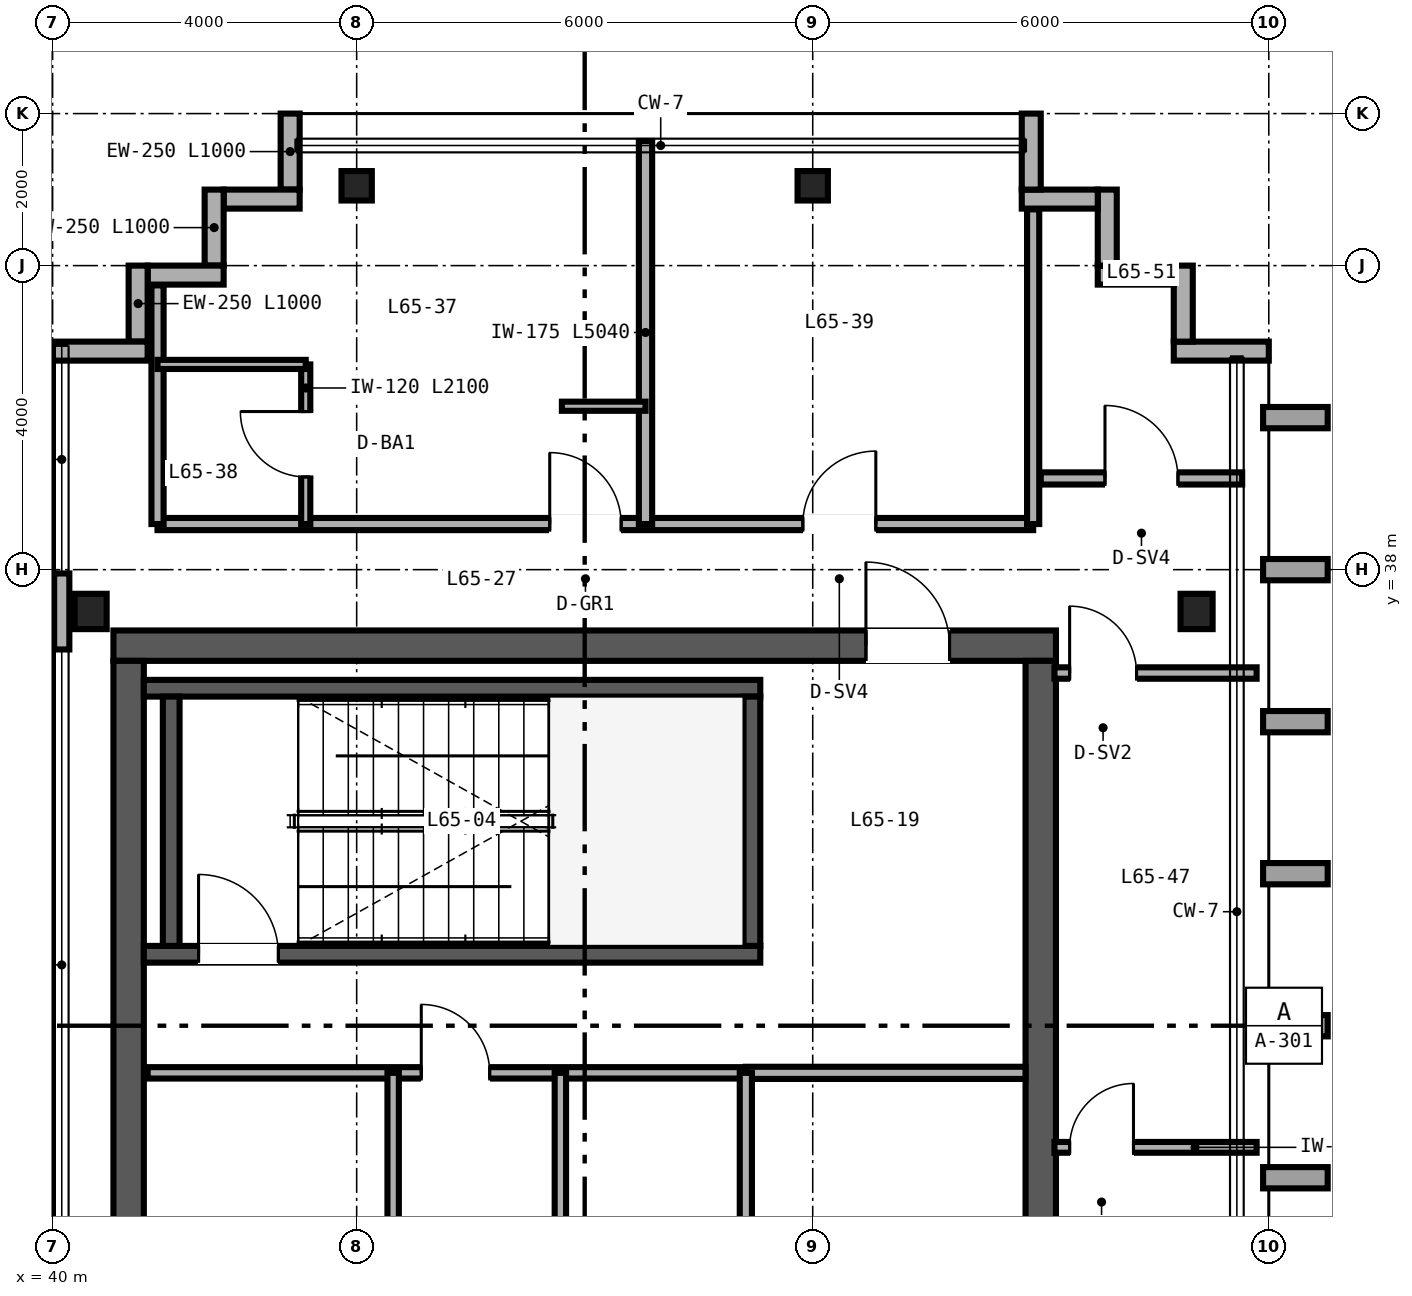
"""IFC4 building model, lengths in metres.
Left out: names, types, materials, properties, quantities, classifications, styles, units other than length and angle.
Written with IfcOpenShell. Run it as: python <this file> out.ifc"""

import sys

from ifc_helpers import new_model, si_unit, direction, frame, frame_2d, origin, origin_2d, place, context, subcontext, project, spatial, rectangle, i_section, extrude, source, transform, mapped, element, fill, save


model = new_model("IFC4")
c1 = context("Model", 3, precision=1e-05, world=origin(), true_north=direction((0.0, 1.0)))
c2 = subcontext(c1, "Body", "Model", "MODEL_VIEW")
j1 = project(units=[si_unit("LENGTHUNIT", "METRE"), si_unit("PLANEANGLEUNIT", "RADIAN")], contexts=[c1])
p1 = place(None, origin())
s1 = spatial("IfcSite", under=j1, at=p1, CompositionType="ELEMENT")
p2 = place(p1, origin())
s2 = spatial("IfcBuilding", under=s1, at=p2, CompositionType="ELEMENT")
p3 = place(p2, frame((0.0, 0.0, 258.0)))
s3 = spatial("IfcBuildingStorey", under=s2, at=p3, CompositionType="ELEMENT", Elevation=258.0)
p4 = place(p3, frame((40.8, 37.0, 0.0), z_axis=(0.0, 0.0, 1.0), x_axis=(1.0, 0.0, 0.0)))
e1 = element("IfcWall", 1, at=p4, inside=s3, PredefinedType="SHEAR", context=c2, shape_type="SweptSolid", body=[
    extrude(rectangle(XDim=12.4, YDim=0.4, at=frame_2d((6.2, 0.0))), origin(), (0.0, 0.0, 1.0), 3.38),
])
p5 = place(p4, frame((9.9, 0.0, 0.0)))
e2 = element("IfcOpeningElement", 2, at=p5, cuts=e1, PredefinedType="OPENING", context=c2, shape_type="SweptSolid", body=[
    extrude(rectangle(XDim=1.1, YDim=2.15, at=frame_2d((0.55, 1.075))), frame((0.0, 0.21, 0.0), z_axis=(0.0, -1.0, 0.0), x_axis=(1.0, 0.0, 0.0)), (0.0, 0.0, 1.0), 0.42),
])
for number, where, z_axis, x_axis in (
    (3, (41.0, 15.2, 0.0), (0.0, 0.0, 1.0), (0.0, 1.0, 0.0)),
    (4, (53.0, 15.2, 0.0), (0.0, 0.0, 1.0), (0.0, 1.0, 0.0)),
):
    element("IfcWall", number, at=place(p3, frame(where, z_axis=z_axis, x_axis=x_axis)), inside=s3, PredefinedType="SHEAR", context=c2, shape_type="SweptSolid", body=[
        extrude(rectangle(XDim=21.6, YDim=0.4, at=frame_2d((10.8, 0.0))), origin(), (0.0, 0.0, 1.0), 3.38),
    ])
p6 = place(p3, frame((41.2, 32.94, 0.0), z_axis=(0.0, 0.0, 1.0), x_axis=(1.0, 0.0, 0.0)))
e5 = element("IfcWall", 5, at=p6, inside=s3, PredefinedType="SHEAR", context=c2, shape_type="SweptSolid", body=[
    extrude(rectangle(XDim=8.11, YDim=0.22, at=frame_2d((4.055, 0.0))), origin(), (0.0, 0.0, 1.0), 3.4),
])
p7 = place(p6, frame((0.72, 0.0, 0.0)))
e6 = element("IfcOpeningElement", 6, at=p7, cuts=e5, PredefinedType="OPENING", context=c2, shape_type="SweptSolid", body=[
    extrude(rectangle(XDim=1.05, YDim=2.15, at=frame_2d((0.525, 1.075))), frame((0.0, 0.12, 0.0), z_axis=(0.0, -1.0, 0.0), x_axis=(1.0, 0.0, 0.0)), (0.0, 0.0, 1.0), 0.24),
])
p8 = place(p3, frame((41.2, 36.44, 0.0), z_axis=(0.0, 0.0, 1.0), x_axis=(1.0, 0.0, 0.0)))
e7 = element("IfcWall", 7, at=p8, inside=s3, PredefinedType="SHEAR", context=c2, shape_type="SweptSolid", body=[
    extrude(rectangle(XDim=8.11, YDim=0.22, at=frame_2d((4.055, 0.0))), origin(), (0.0, 0.0, 1.0), 3.4),
])
for number, where, z_axis, x_axis in (
    (8, (41.56, 33.05, 0.0), (0.0, 0.0, 1.0), (0.0, 1.0, 0.0)),
    (9, (49.2, 33.05, 0.0), (0.0, 0.0, 1.0), (0.0, 1.0, 0.0)),
):
    element("IfcWall", number, at=place(p3, frame(where, z_axis=z_axis, x_axis=x_axis)), inside=s3, PredefinedType="SHEAR", context=c2, shape_type="SweptSolid", body=[
        extrude(rectangle(XDim=3.28, YDim=0.22, at=frame_2d((1.64, 0.0))), origin(), (0.0, 0.0, 1.0), 3.4),
    ])
m1 = source(origin(), c2, "Body", "SweptSolid", [
    extrude(i_section(OverallWidth=0.422, OverallDepth=0.465, WebThickness=0.045, FlangeThickness=0.073, FilletRadius=0.025, at=origin_2d()), origin(), (0.0, 0.0, 1.0), 3.38),
])
for number, where, z_axis, x_axis in (
    (10, (40.5, 37.45, 0.0), (0.0, 0.0, 1.0), (1.0, 0.0, 0.0)),
    (11, (55.05, 37.45, 0.0), (0.0, 0.0, 1.0), (1.0, 0.0, 0.0)),
):
    element("IfcColumn", number, at=place(p3, frame(where, z_axis=z_axis, x_axis=x_axis)), inside=s3, PredefinedType="COLUMN", context=c2, shape_type="MappedRepresentation", body=[
        mapped(m1, transform((0.0, 0.0, 0.0), scale=1.0)),
    ])
m2 = source(origin(), c2, "Body", "SweptSolid", [
    extrude(i_section(OverallWidth=0.399, OverallDepth=0.387, WebThickness=0.021, FlangeThickness=0.033, FilletRadius=0.025, at=origin_2d()), origin(), (0.0, 0.0, 1.0), 3.38),
])
for number, where, z_axis, x_axis in (
    (12, (44.0, 43.05, 0.0), (0.0, 0.0, 1.0), (1.0, 0.0, 0.0)),
    (13, (50.0, 43.05, 0.0), (0.0, 0.0, 1.0), (1.0, 0.0, 0.0)),
):
    element("IfcColumn", number, at=place(p3, frame(where, z_axis=z_axis, x_axis=x_axis)), inside=s3, PredefinedType="COLUMN", context=c2, shape_type="MappedRepresentation", body=[
        mapped(m2, transform((0.0, 0.0, 0.0), scale=1.0)),
    ])
p9 = place(p3, frame((56.0, 40.875, 0.0), z_axis=(0.0, 0.0, 1.0), x_axis=(-1.0, 0.0, 0.0)))
e14 = element("IfcWall", 14, at=p9, inside=s3, PredefinedType="SOLIDWALL", context=c2, shape_type="SweptSolid", body=[
    extrude(rectangle(XDim=1.25, YDim=0.25, at=frame_2d((0.625, 0.0))), origin(), (0.0, 0.0, 1.0), 3.38),
])
for number, where, z_axis, x_axis in (
    (15, (54.875, 41.0, 0.0), (0.0, 0.0, 1.0), (0.0, 1.0, 0.0)),
    (16, (54.75, 41.875, 0.0), (0.0, 0.0, 1.0), (-1.0, 0.0, 0.0)),
    (17, (53.875, 42.0, 0.0), (0.0, 0.0, 1.0), (0.0, 1.0, 0.0)),
    (18, (53.75, 42.875, 0.0), (0.0, 0.0, 1.0), (-1.0, 0.0, 0.0)),
    (19, (52.875, 43.0, 0.0), (0.0, 0.0, 1.0), (0.0, 1.0, 0.0)),
    (20, (43.125, 44.0, 0.0), (0.0, 0.0, 1.0), (0.0, -1.0, 0.0)),
    (21, (43.25, 42.875, 0.0), (0.0, 0.0, 1.0), (-1.0, 0.0, 0.0)),
    (22, (42.125, 43.0, 0.0), (0.0, 0.0, 1.0), (0.0, -1.0, 0.0)),
    (23, (42.25, 41.875, 0.0), (0.0, 0.0, 1.0), (-1.0, 0.0, 0.0)),
    (24, (41.125, 42.0, 0.0), (0.0, 0.0, 1.0), (0.0, -1.0, 0.0)),
):
    element("IfcWall", number, at=place(p3, frame(where, z_axis=z_axis, x_axis=x_axis)), inside=s3, PredefinedType="SOLIDWALL", context=c2, shape_type="SweptSolid", body=[
        extrude(rectangle(XDim=1.0, YDim=0.25, at=frame_2d((0.5, 0.0))), origin(), (0.0, 0.0, 1.0), 3.38),
    ])
p10 = place(p3, frame((41.25, 40.875, 0.0), z_axis=(0.0, 0.0, 1.0), x_axis=(-1.0, 0.0, 0.0)))
e25 = element("IfcWall", 25, at=p10, inside=s3, PredefinedType="SOLIDWALL", context=c2, shape_type="SweptSolid", body=[
    extrude(rectangle(XDim=1.25, YDim=0.25, at=frame_2d((0.625, 0.0))), origin(), (0.0, 0.0, 1.0), 3.38),
])
p11 = place(p3, frame((40.12, 36.95, 0.0), z_axis=(0.0, 0.0, 1.0), x_axis=(0.0, 1.0, 0.0)))
e26 = element("IfcWall", 26, at=p11, inside=s3, PredefinedType="PARAPET", context=c2, shape_type="SweptSolid", body=[
    extrude(rectangle(XDim=1.0, YDim=0.2, at=frame_2d((0.5, 0.0))), origin(), (0.0, 0.0, 1.0), 3.38),
])
p12 = place(p3, frame((41.25, 31.38, 0.0), z_axis=(0.0, 0.0, 1.0), x_axis=(1.0, 0.0, 0.0)))
e27 = element("IfcWall", 27, at=p12, inside=s3, PredefinedType="PARTITIONING", context=c2, shape_type="SweptSolid", body=[
    extrude(rectangle(XDim=7.87, YDim=0.15, at=frame_2d((3.935, 0.0))), origin(), (0.0, 0.0, 1.0), 2.48),
])
p13 = place(p12, frame((3.6, 0.0, 0.0)))
e28 = element("IfcOpeningElement", 28, at=p13, cuts=e27, PredefinedType="OPENING", context=c2, shape_type="SweptSolid", body=[
    extrude(rectangle(XDim=0.9, YDim=2.15, at=frame_2d((0.45, 1.075))), frame((0.0, 0.085, 0.0), z_axis=(0.0, -1.0, 0.0), x_axis=(1.0, 0.0, 0.0)), (0.0, 0.0, 1.0), 0.17),
])
p14 = place(p3, frame((46.68, 15.25, 0.0), z_axis=(0.0, 0.0, 1.0), x_axis=(0.0, 1.0, 0.0)))
e29 = element("IfcWall", 29, at=p14, inside=s3, PredefinedType="PARTITIONING", context=c2, shape_type="SweptSolid", body=[
    extrude(rectangle(XDim=16.13, YDim=0.15, at=frame_2d((8.065, 0.0))), origin(), (0.0, 0.0, 1.0), 2.453),
])
p15 = place(p14, frame((7.5, 0.0, 0.0)))
e30 = element("IfcOpeningElement", 30, at=p15, cuts=e29, PredefinedType="OPENING", context=c2, shape_type="SweptSolid", body=[
    extrude(rectangle(XDim=0.9, YDim=2.15, at=frame_2d((0.45, 1.075))), frame((0.0, 0.085, 0.0), z_axis=(0.0, -1.0, 0.0), x_axis=(1.0, 0.0, 0.0)), (0.0, 0.0, 1.0), 0.17),
])
p16 = place(p3, frame((49.12, 31.38, 0.0), z_axis=(0.0, 0.0, 1.0), x_axis=(1.0, 0.0, 0.0)))
e31 = element("IfcWall", 31, at=p16, inside=s3, PredefinedType="PARTITIONING", context=c2, shape_type="SweptSolid", body=[
    extrude(rectangle(XDim=3.68, YDim=0.16, at=frame_2d((1.84, 0.0))), origin(), (0.0, 0.0, 1.0), 2.48),
])
p17 = place(p3, frame((49.12, 15.25, 0.0), z_axis=(0.0, 0.0, 1.0), x_axis=(0.0, 1.0, 0.0)))
e32 = element("IfcWall", 32, at=p17, inside=s3, PredefinedType="PARTITIONING", context=c2, shape_type="SweptSolid", body=[
    extrude(rectangle(XDim=16.13, YDim=0.16, at=frame_2d((8.065, 0.0))), origin(), (0.0, 0.0, 1.0), 2.453),
])
p18 = place(p17, frame((4.0, 0.0, 0.0)))
e33 = element("IfcOpeningElement", 33, at=p18, cuts=e32, PredefinedType="OPENING", context=c2, shape_type="SweptSolid", body=[
    extrude(rectangle(XDim=0.92, YDim=2.15, at=frame_2d((0.46, 1.075))), frame((0.0, 0.09, 0.0), z_axis=(0.0, -1.0, 0.0), x_axis=(1.0, 0.0, 0.0)), (0.0, 0.0, 1.0), 0.18),
])
p19 = place(p17, frame((12.0, 0.0, 0.0)))
e34 = element("IfcOpeningElement", 34, at=p19, cuts=e32, PredefinedType="OPENING", context=c2, shape_type="SweptSolid", body=[
    extrude(rectangle(XDim=0.92, YDim=2.15, at=frame_2d((0.46, 1.075))), frame((0.0, 0.09, 0.0), z_axis=(0.0, -1.0, 0.0), x_axis=(1.0, 0.0, 0.0)), (0.0, 0.0, 1.0), 0.18),
])
p20 = place(p3, frame((44.48, 15.25, 0.0), z_axis=(0.0, 0.0, 1.0), x_axis=(0.0, 1.0, 0.0)))
e35 = element("IfcWall", 35, at=p20, inside=s3, PredefinedType="PARTITIONING", context=c2, shape_type="SweptSolid", body=[
    extrude(rectangle(XDim=16.13, YDim=0.15, at=frame_2d((8.065, 0.0))), origin(), (0.0, 0.0, 1.0), 2.453),
])
p21 = place(p20, frame((4.5, 0.0, 0.0)))
e36 = element("IfcOpeningElement", 36, at=p21, cuts=e35, PredefinedType="OPENING", context=c2, shape_type="SweptSolid", body=[
    extrude(rectangle(XDim=0.92, YDim=2.15, at=frame_2d((0.46, 1.075))), frame((0.0, 0.085, 0.0), z_axis=(0.0, -1.0, 0.0), x_axis=(1.0, 0.0, 0.0)), (0.0, 0.0, 1.0), 0.17),
])
p22 = place(p3, frame((41.38, 38.6, 0.0), z_axis=(0.0, 0.0, 1.0), x_axis=(1.0, 0.0, 0.0)))
e37 = element("IfcWall", 37, at=p22, inside=s3, PredefinedType="PARTITIONING", context=c2, shape_type="SweptSolid", body=[
    extrude(rectangle(XDim=11.52, YDim=0.16, at=frame_2d((5.76, 0.0))), origin(), (0.0, 0.0, 1.0), 3.38),
])
p23 = place(p22, frame((5.16, 0.0, 0.0)))
e38 = element("IfcOpeningElement", 38, at=p23, cuts=e37, PredefinedType="OPENING", context=c2, shape_type="SweptSolid", body=[
    extrude(rectangle(XDim=0.94, YDim=2.15, at=frame_2d((0.47, 1.075))), frame((0.0, 0.09, 0.0), z_axis=(0.0, -1.0, 0.0), x_axis=(1.0, 0.0, 0.0)), (0.0, 0.0, 1.0), 0.18),
])
p24 = place(p22, frame((8.49, 0.0, 0.0)))
e39 = element("IfcOpeningElement", 39, at=p24, cuts=e37, PredefinedType="OPENING", context=c2, shape_type="SweptSolid", body=[
    extrude(rectangle(XDim=0.96, YDim=2.15, at=frame_2d((0.48, 1.075))), frame((0.0, 0.09, 0.0), z_axis=(0.0, -1.0, 0.0), x_axis=(1.0, 0.0, 0.0)), (0.0, 0.0, 1.0), 0.18),
])
p25 = place(p3, frame((41.38, 38.6, 0.0), z_axis=(0.0, 0.0, 1.0), x_axis=(0.0, 1.0, 0.0)))
e40 = element("IfcWall", 40, at=p25, inside=s3, PredefinedType="PARTITIONING", context=c2, shape_type="SweptSolid", body=[
    extrude(rectangle(XDim=3.14, YDim=0.16, at=frame_2d((1.57, 0.0))), origin(), (0.0, 0.0, 1.0), 3.38),
])
p26 = place(p3, frame((52.9, 38.6, 0.0), z_axis=(0.0, 0.0, 1.0), x_axis=(0.0, 1.0, 0.0)))
e41 = element("IfcWall", 41, at=p26, inside=s3, PredefinedType="PARTITIONING", context=c2, shape_type="SweptSolid", body=[
    extrude(rectangle(XDim=4.14, YDim=0.16, at=frame_2d((2.07, 0.0))), origin(), (0.0, 0.0, 1.0), 3.38),
])
p27 = place(p3, frame((47.8, 38.6, 0.0), z_axis=(0.0, 0.0, 1.0), x_axis=(0.0, 1.0, 0.0)))
e42 = element("IfcWall", 42, at=p27, inside=s3, PredefinedType="PARTITIONING", context=c2, shape_type="SweptSolid", body=[
    extrude(rectangle(XDim=5.04, YDim=0.175, at=frame_2d((2.52, 0.0))), origin(), (0.0, 0.0, 1.0), 2.687),
])
p28 = place(p3, frame((43.33, 38.6, 0.0), z_axis=(0.0, 0.0, 1.0), x_axis=(0.0, 1.0, 0.0)))
e43 = element("IfcWall", 43, at=p28, inside=s3, PredefinedType="PARTITIONING", context=c2, shape_type="SweptSolid", body=[
    extrude(rectangle(XDim=2.1, YDim=0.12, at=frame_2d((1.05, 0.0))), origin(), (0.0, 0.0, 1.0), 3.38),
])
p29 = place(p28, frame((0.62, 0.0, 0.0)))
e44 = element("IfcOpeningElement", 44, at=p29, cuts=e43, PredefinedType="OPENING", context=c2, shape_type="SweptSolid", body=[
    extrude(rectangle(XDim=0.86, YDim=2.1, at=frame_2d((0.43, 1.05))), frame((0.0, 0.07, 0.0), z_axis=(0.0, -1.0, 0.0), x_axis=(1.0, 0.0, 0.0)), (0.0, 0.0, 1.0), 0.14),
])
p30 = place(p3, frame((41.38, 40.7, 0.0), z_axis=(0.0, 0.0, 1.0), x_axis=(1.0, 0.0, 0.0)))
e45 = element("IfcWall", 45, at=p30, inside=s3, PredefinedType="PARTITIONING", context=c2, shape_type="SweptSolid", body=[
    extrude(rectangle(XDim=1.95, YDim=0.12, at=frame_2d((0.975, 0.0))), origin(), (0.0, 0.0, 1.0), 3.38),
])
p31 = place(p3, frame((46.7, 40.15, 0.0), z_axis=(0.0, 0.0, 1.0), x_axis=(1.0, 0.0, 0.0)))
e46 = element("IfcWall", 46, at=p31, inside=s3, PredefinedType="PARTITIONING", context=c2, shape_type="SweptSolid", body=[
    extrude(rectangle(XDim=1.1, YDim=0.12, at=frame_2d((0.55, 0.0))), origin(), (0.0, 0.0, 1.0), 3.38),
])
p32 = place(p3, frame((53.18, 36.64, 0.0), z_axis=(0.0, 0.0, 1.0), x_axis=(1.0, 0.0, 0.0)))
e47 = element("IfcWall", 47, at=p32, inside=s3, PredefinedType="PARTITIONING", context=c2, shape_type="SweptSolid", body=[
    extrude(rectangle(XDim=2.66, YDim=0.15, at=frame_2d((1.33, 0.0))), origin(), (0.0, 0.0, 1.0), 2.763),
])
p33 = place(p32, frame((0.2, 0.0, 0.0)))
e48 = element("IfcOpeningElement", 48, at=p33, cuts=e47, PredefinedType="OPENING", context=c2, shape_type="SweptSolid", body=[
    extrude(rectangle(XDim=0.88, YDim=2.15, at=frame_2d((0.44, 1.075))), frame((0.0, 0.085, 0.0), z_axis=(0.0, -1.0, 0.0), x_axis=(1.0, 0.0, 0.0)), (0.0, 0.0, 1.0), 0.17),
])
p34 = place(p3, frame((53.18, 30.4, 0.0), z_axis=(0.0, 0.0, 1.0), x_axis=(1.0, 0.0, 0.0)))
e49 = element("IfcWall", 49, at=p34, inside=s3, PredefinedType="PARTITIONING", context=c2, shape_type="SweptSolid", body=[
    extrude(rectangle(XDim=2.66, YDim=0.142, at=frame_2d((1.33, 0.0))), origin(), (0.0, 0.0, 1.0), 2.763),
])
p35 = place(p34, frame((0.2, 0.0, 0.0)))
e50 = element("IfcOpeningElement", 50, at=p35, cuts=e49, PredefinedType="OPENING", context=c2, shape_type="SweptSolid", body=[
    extrude(rectangle(XDim=0.84, YDim=2.1, at=frame_2d((0.42, 1.05))), frame((0.0, 0.081, 0.0), z_axis=(0.0, -1.0, 0.0), x_axis=(1.0, 0.0, 0.0)), (0.0, 0.0, 1.0), 0.162),
])
p36 = place(p3, frame((53.0, 39.2, 0.0), z_axis=(0.0, 0.0, 1.0), x_axis=(1.0, 0.0, 0.0)))
e51 = element("IfcWall", 51, at=p36, inside=s3, PredefinedType="PARTITIONING", context=c2, shape_type="SweptSolid", body=[
    extrude(rectangle(XDim=2.65, YDim=0.16, at=frame_2d((1.325, 0.0))), origin(), (0.0, 0.0, 1.0), 3.38),
])
p37 = place(p36, frame((0.845, 0.0, 0.0)))
e52 = element("IfcOpeningElement", 52, at=p37, cuts=e51, PredefinedType="OPENING", context=c2, shape_type="SweptSolid", body=[
    extrude(rectangle(XDim=0.96, YDim=2.15, at=frame_2d((0.48, 1.075))), frame((0.0, 0.09, 0.0), z_axis=(0.0, -1.0, 0.0), x_axis=(1.0, 0.0, 0.0)), (0.0, 0.0, 1.0), 0.18),
])
m3 = source(origin(), c2, "Body", "SweptSolid", [
    extrude(rectangle(XDim=1.05, YDim=2.15, at=frame_2d((0.525, 1.075))), frame((0.0, 0.025, 0.0), z_axis=(0.0, -1.0, 0.0), x_axis=(1.0, 0.0, 0.0)), (0.0, 0.0, 1.0), 0.05),
])
p38 = place(p7, origin())
e53 = element("IfcDoor", 53, at=p38, inside=s3, OperationType="SINGLE_SWING_LEFT", PredefinedType="DOOR", context=c2, shape_type="MappedRepresentation", body=[
    mapped(m3, transform((0.0, 0.0, 0.0), scale=1.0)),
])
fill(e6, e53)
m4 = source(origin(), c2, "Body", "SweptSolid", [
    extrude(rectangle(XDim=0.9, YDim=2.15, at=frame_2d((0.45, 1.075))), frame((0.0, 0.025, 0.0), z_axis=(0.0, -1.0, 0.0), x_axis=(1.0, 0.0, 0.0)), (0.0, 0.0, 1.0), 0.05),
])
p39 = place(p13, origin())
e54 = element("IfcDoor", 54, at=p39, inside=s3, OperationType="SINGLE_SWING_LEFT", PredefinedType="DOOR", context=c2, shape_type="MappedRepresentation", body=[
    mapped(m4, transform((0.0, 0.0, 0.0), scale=1.0)),
])
fill(e28, e54)
m5 = source(origin(), c2, "Body", "SweptSolid", [
    extrude(rectangle(XDim=1.1, YDim=2.15, at=frame_2d((0.55, 1.075))), frame((0.0, 0.025, 0.0), z_axis=(0.0, -1.0, 0.0), x_axis=(1.0, 0.0, 0.0)), (0.0, 0.0, 1.0), 0.05),
])
p40 = place(p5, origin())
e55 = element("IfcDoor", 55, at=p40, inside=s3, OperationType="SINGLE_SWING_LEFT", PredefinedType="DOOR", context=c2, shape_type="MappedRepresentation", body=[
    mapped(m5, transform((0.0, 0.0, 0.0), scale=1.0)),
])
fill(e2, e55)
m6 = source(origin(), c2, "Body", "SweptSolid", [
    extrude(rectangle(XDim=0.86, YDim=2.1, at=frame_2d((0.43, 1.05))), frame((0.0, 0.025, 0.0), z_axis=(0.0, -1.0, 0.0), x_axis=(1.0, 0.0, 0.0)), (0.0, 0.0, 1.0), 0.05),
])
p41 = place(p29, origin())
e56 = element("IfcDoor", 56, at=p41, inside=s3, OperationType="SINGLE_SWING_RIGHT", PredefinedType="DOOR", context=c2, shape_type="MappedRepresentation", body=[
    mapped(m6, transform((0.0, 0.0, 0.0), scale=1.0)),
])
fill(e44, e56)
m7 = source(origin(), c2, "Body", "SweptSolid", [
    extrude(rectangle(XDim=0.94, YDim=2.15, at=frame_2d((0.47, 1.075))), frame((0.0, 0.025, 0.0), z_axis=(0.0, -1.0, 0.0), x_axis=(1.0, 0.0, 0.0)), (0.0, 0.0, 1.0), 0.05),
])
p42 = place(p23, origin())
e57 = element("IfcDoor", 57, at=p42, inside=s3, OperationType="SINGLE_SWING_LEFT", PredefinedType="DOOR", context=c2, shape_type="MappedRepresentation", body=[
    mapped(m7, transform((0.0, 0.0, 0.0), scale=1.0)),
])
fill(e38, e57)
m8 = source(origin(), c2, "Body", "SweptSolid", [
    extrude(rectangle(XDim=0.96, YDim=2.15, at=frame_2d((0.48, 1.075))), frame((0.0, 0.025, 0.0), z_axis=(0.0, -1.0, 0.0), x_axis=(1.0, 0.0, 0.0)), (0.0, 0.0, 1.0), 0.05),
])
p43 = place(p24, origin())
e58 = element("IfcDoor", 58, at=p43, inside=s3, OperationType="SINGLE_SWING_RIGHT", PredefinedType="DOOR", context=c2, shape_type="MappedRepresentation", body=[
    mapped(m8, transform((0.0, 0.0, 0.0), scale=1.0)),
])
fill(e39, e58)
m9 = source(origin(), c2, "Body", "SweptSolid", [
    extrude(rectangle(XDim=0.88, YDim=2.15, at=frame_2d((0.44, 1.075))), frame((0.0, 0.025, 0.0), z_axis=(0.0, -1.0, 0.0), x_axis=(1.0, 0.0, 0.0)), (0.0, 0.0, 1.0), 0.05),
])
p44 = place(p33, origin())
e59 = element("IfcDoor", 59, at=p44, inside=s3, OperationType="SINGLE_SWING_LEFT", PredefinedType="DOOR", context=c2, shape_type="MappedRepresentation", body=[
    mapped(m9, transform((0.0, 0.0, 0.0), scale=1.0)),
])
fill(e48, e59)
m10 = source(origin(), c2, "Body", "SweptSolid", [
    extrude(rectangle(XDim=0.84, YDim=2.1, at=frame_2d((0.42, 1.05))), frame((0.0, 0.025, 0.0), z_axis=(0.0, -1.0, 0.0), x_axis=(1.0, 0.0, 0.0)), (0.0, 0.0, 1.0), 0.05),
])
p45 = place(p35, origin())
e60 = element("IfcDoor", 60, at=p45, inside=s3, OperationType="SINGLE_SWING_RIGHT", PredefinedType="DOOR", context=c2, shape_type="MappedRepresentation", body=[
    mapped(m10, transform((0.0, 0.0, 0.0), scale=1.0)),
])
fill(e50, e60)
p46 = place(p37, origin())
e61 = element("IfcDoor", 61, at=p46, inside=s3, OperationType="SINGLE_SWING_LEFT", PredefinedType="DOOR", context=c2, shape_type="MappedRepresentation", body=[
    mapped(m8, transform((0.0, 0.0, 0.0), scale=1.0)),
])
fill(e52, e61)
save(model, sys.argv[1])
